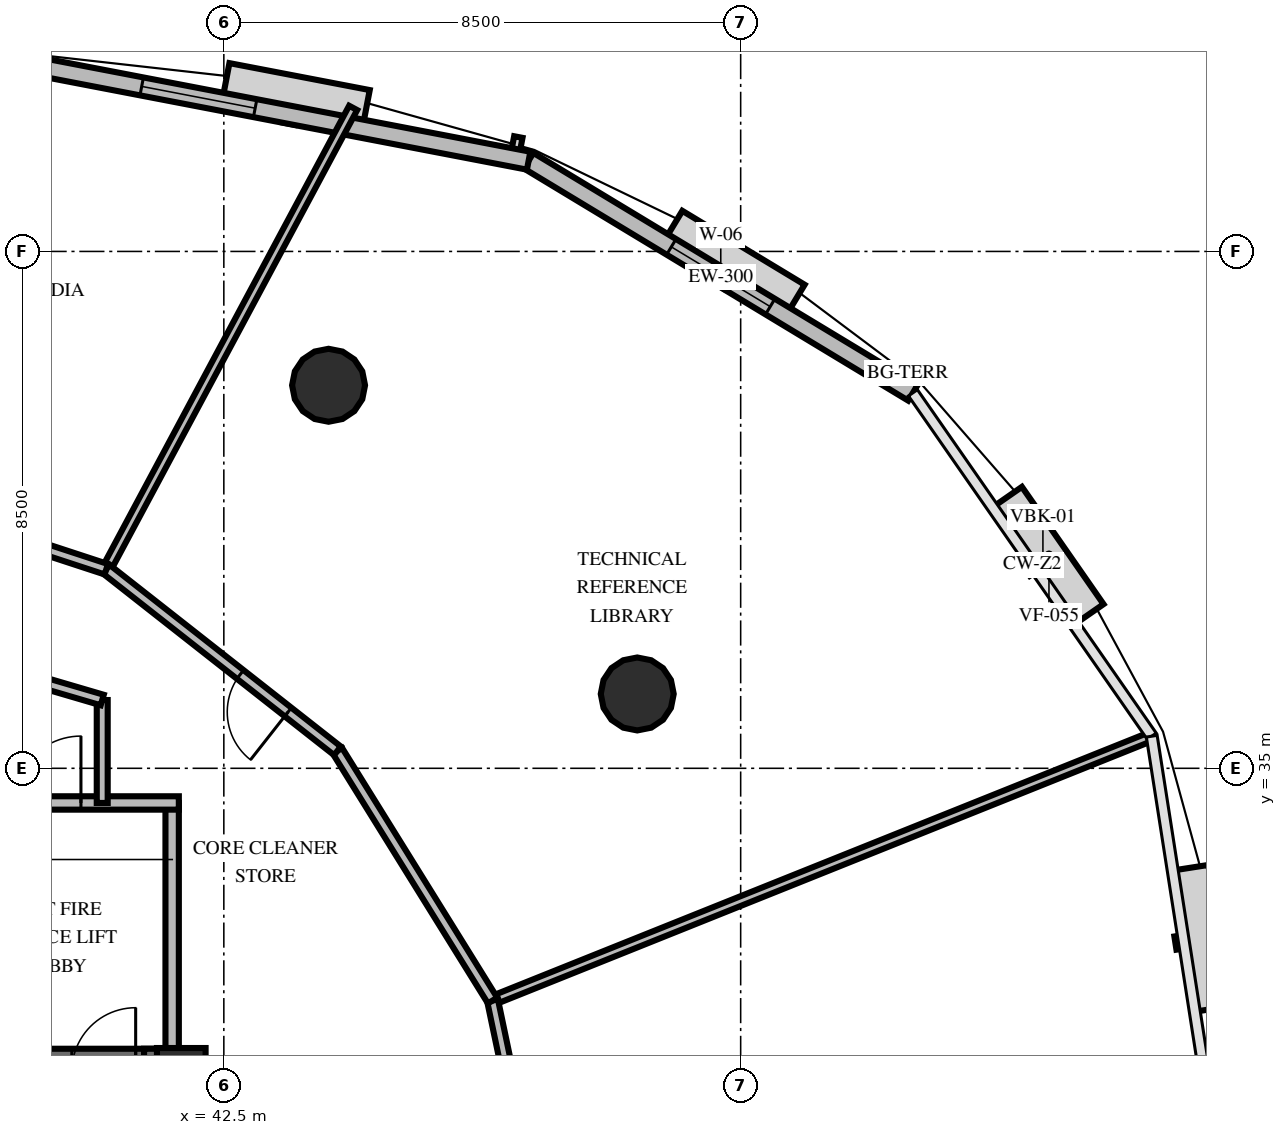
"""IFC4 building model, lengths in metres.
Left out: names, types, materials, properties, quantities, classifications, styles, units other than length and angle.
Written with IfcOpenShell. Run it as: python <this file> out.ifc"""

import sys

from ifc_helpers import new_model, si_unit, direction, frame, frame_2d, origin, origin_2d, place, context, subcontext, project, spatial, rectangle, circle, extrude, element, fill, save


model = new_model("IFC4")
c1 = context("Model", 3, precision=1e-05, world=origin(), true_north=direction((0.0, 1.0)))
c2 = subcontext(c1, "Body", "Model", "MODEL_VIEW")
j1 = project(units=[si_unit("LENGTHUNIT", "METRE"), si_unit("PLANEANGLEUNIT", "RADIAN")], contexts=[c1])
p1 = place(None, origin())
s1 = spatial("IfcSite", under=j1, at=p1, CompositionType="ELEMENT")
p2 = place(p1, origin())
s2 = spatial("IfcBuilding", under=s1, at=p2, CompositionType="ELEMENT")
p3 = place(p2, frame((0.0, 0.0, 125.8)))
s3 = spatial("IfcBuildingStorey", under=s2, at=p3, CompositionType="ELEMENT", Elevation=125.8)
p4 = place(p3, frame((26.072, 30.013, 0.0), z_axis=(0.0, 0.0, 1.0), x_axis=(1.0, 0.0, 0.0)))
e1 = element("IfcWall", 1, at=p4, inside=s3, PredefinedType="SHEAR", context=c2, shape_type="SweptSolid", body=[
    extrude(rectangle(XDim=15.866, YDim=0.75, at=frame_2d((7.933, 0.0))), origin(), (0.0, 0.0, 1.0), 4.0),
])
p5 = place(p4, frame((0.878, 0.0, 0.0)))
e2 = element("IfcOpeningElement", 2, at=p5, cuts=e1, PredefinedType="OPENING", context=c2, shape_type="SweptSolid", body=[
    extrude(rectangle(XDim=1.05, YDim=2.15, at=frame_2d((0.525, 1.075))), frame((0.0, 0.385, 0.0), z_axis=(0.0, -1.0, 0.0), x_axis=(1.0, 0.0, 0.0)), (0.0, 0.0, 1.0), 0.77),
])
p6 = place(p4, frame((13.928, 0.0, 0.0)))
e3 = element("IfcOpeningElement", 3, at=p6, cuts=e1, PredefinedType="OPENING", context=c2, shape_type="SweptSolid", body=[
    extrude(rectangle(XDim=1.05, YDim=2.15, at=frame_2d((0.525, 1.075))), frame((0.0, 0.385, 0.0), z_axis=(0.0, -1.0, 0.0), x_axis=(1.0, 0.0, 0.0)), (0.0, 0.0, 1.0), 0.77),
])
p7 = place(p4, frame((7.378, 0.0, 0.0)))
e4 = element("IfcOpeningElement", 4, at=p7, cuts=e1, PredefinedType="OPENING", context=c2, shape_type="SweptSolid", body=[
    extrude(rectangle(XDim=1.1, YDim=2.15, at=frame_2d((0.55, 1.075))), frame((0.0, 0.385, 0.0), z_axis=(0.0, -1.0, 0.0), x_axis=(1.0, 0.0, 0.0)), (0.0, 0.0, 1.0), 0.77),
])
p8 = place(p3, frame((41.563, 19.812, 0.0), z_axis=(0.0, 0.0, 1.0), x_axis=(0.0, 1.0, 0.0)))
e5 = element("IfcWall", 5, at=p8, inside=s3, PredefinedType="SHEAR", context=c2, shape_type="SweptSolid", body=[
    extrude(rectangle(XDim=10.576, YDim=0.75, at=frame_2d((5.288, 0.0))), origin(), (0.0, 0.0, 1.0), 4.0),
])
p9 = place(p3, frame((41.8, 30.0, 0.0), z_axis=(0.0, 0.0, 1.0), x_axis=(1.0, 0.0, 0.0)))
e6 = element("IfcColumn", 6, at=p9, inside=s3, PredefinedType="PILASTER", context=c2, shape_type="SweptSolid", body=[
    extrude(rectangle(XDim=0.8, YDim=0.8, at=origin_2d()), origin(), (0.0, 0.0, 1.0), 4.0),
])
for number, where, z_axis, x_axis in (
    (7, (49.299, 36.222, 0.0), (0.0, 0.0, 1.0), (1.0, 0.0, 0.0)),
    (8, (44.222, 41.299, 0.0), (0.0, 0.0, 1.0), (1.0, 0.0, 0.0)),
):
    element("IfcColumn", number, at=place(p3, frame(where, z_axis=z_axis, x_axis=x_axis)), inside=s3, PredefinedType="COLUMN", context=c2, shape_type="SweptSolid", body=[
        extrude(circle(Radius=0.6, at=origin_2d()), origin(), (0.0, 0.0, 1.0), 4.0),
    ])
p10 = place(p3, frame((53.833, 41.175, 0.0), z_axis=(0.0, 0.0, 1.0), x_axis=(-0.856004258132, 0.516968770875, 0.0)))
e9 = element("IfcWall", 9, at=p10, inside=s3, PredefinedType="SOLIDWALL", context=c2, shape_type="SweptSolid", body=[
    extrude(rectangle(XDim=7.383, YDim=0.3, at=frame_2d((3.692, 0.0))), origin(), (0.0, 0.0, 1.0), 2.9),
])
p11 = place(p10, frame((2.742, 0.0, 0.8)))
e10 = element("IfcOpeningElement", 10, at=p11, cuts=e9, PredefinedType="OPENING", context=c2, shape_type="SweptSolid", body=[
    extrude(rectangle(XDim=1.9, YDim=1.95, at=frame_2d((0.95, 0.975))), frame((0.0, 0.16, 0.0), z_axis=(0.0, -1.0, 0.0), x_axis=(1.0, 0.0, 0.0)), (0.0, 0.0, 1.0), 0.32),
])
p12 = place(p3, frame((47.513, 44.992, 0.0), z_axis=(0.0, 0.0, 1.0), x_axis=(-0.982062977667, 0.188553196461, 0.0)))
e11 = element("IfcWall", 11, at=p12, inside=s3, PredefinedType="SOLIDWALL", context=c2, shape_type="SweptSolid", body=[
    extrude(rectangle(XDim=8.095, YDim=0.3, at=frame_2d((4.048, 0.0))), origin(), (0.0, 0.0, 1.0), 2.9),
])
p13 = place(p12, frame((4.58, 0.0, 0.8)))
e12 = element("IfcOpeningElement", 12, at=p13, cuts=e11, PredefinedType="OPENING", context=c2, shape_type="SweptSolid", body=[
    extrude(rectangle(XDim=1.9, YDim=1.95, at=frame_2d((0.95, 0.975))), frame((0.0, 0.16, 0.0), z_axis=(0.0, -1.0, 0.0), x_axis=(1.0, 0.0, 0.0)), (0.0, 0.0, 1.0), 0.32),
])
p14 = place(p3, frame((41.65, 30.05, 0.0), z_axis=(0.0, 0.0, 1.0), x_axis=(0.0, 1.0, 0.0)))
e13 = element("IfcWall", 13, at=p14, inside=s3, PredefinedType="SOLIDWALL", context=c2, shape_type="SweptSolid", body=[
    extrude(rectangle(XDim=4.38, YDim=0.22, at=frame_2d((2.19, 0.0))), origin(), (0.0, 0.0, 1.0), 2.8),
])
p15 = place(p3, frame((37.45, 34.43, 0.0), z_axis=(0.0, 0.0, 1.0), x_axis=(1.0, 0.0, 0.0)))
e14 = element("IfcWall", 14, at=p15, inside=s3, PredefinedType="SOLIDWALL", context=c2, shape_type="SweptSolid", body=[
    extrude(rectangle(XDim=4.31, YDim=0.22, at=frame_2d((2.155, 0.0))), origin(), (0.0, 0.0, 1.0), 2.8),
])
p16 = place(p15, frame((1.6, 0.0, 0.0)))
e15 = element("IfcOpeningElement", 15, at=p16, cuts=e14, PredefinedType="OPENING", context=c2, shape_type="SweptSolid", body=[
    extrude(rectangle(XDim=1.1, YDim=2.15, at=frame_2d((0.55, 1.075))), frame((0.0, 0.12, 0.0), z_axis=(0.0, -1.0, 0.0), x_axis=(1.0, 0.0, 0.0)), (0.0, 0.0, 1.0), 0.24),
])
p17 = place(p3, frame((40.5, 36.123, 0.0), z_axis=(0.0, 0.0, 1.0), x_axis=(0.0, -1.0, 0.0)))
e16 = element("IfcWall", 16, at=p17, inside=s3, PredefinedType="PARTITIONING", context=c2, shape_type="SweptSolid", body=[
    extrude(rectangle(XDim=1.693, YDim=0.18, at=frame_2d((0.846, 0.0))), origin(), (0.0, 0.0, 1.0), 2.8),
])
p18 = place(p3, frame((34.0, 38.03, 0.0), z_axis=(0.0, 0.0, 1.0), x_axis=(0.959546654541, -0.281549671923, 0.0)))
e17 = element("IfcWall", 17, at=p18, inside=s3, PredefinedType="PARTITIONING", context=c2, shape_type="SweptSolid", body=[
    extrude(rectangle(XDim=6.774, YDim=0.18, at=frame_2d((3.387, 0.0))), origin(), (0.0, 0.0, 1.0), 2.8),
])
p19 = place(p18, frame((2.837, 0.0, 0.0)))
e18 = element("IfcOpeningElement", 18, at=p19, cuts=e17, PredefinedType="OPENING", context=c2, shape_type="SweptSolid", body=[
    extrude(rectangle(XDim=1.1, YDim=2.15, at=frame_2d((0.55, 1.075))), frame((0.0, 0.1, 0.0), z_axis=(0.0, -1.0, 0.0), x_axis=(1.0, 0.0, 0.0)), (0.0, 0.0, 1.0), 0.2),
])
p20 = place(p3, frame((46.92, 31.181, 0.0), z_axis=(0.0, 0.0, 1.0), x_axis=(0.928159216565, 0.372183380479, 0.0)))
e19 = element("IfcWall", 19, at=p20, inside=s3, PredefinedType="PARTITIONING", context=c2, shape_type="SweptSolid", body=[
    extrude(rectangle(XDim=11.68, YDim=0.15, at=frame_2d((5.84, 0.0))), origin(), (0.0, 0.0, 1.0), 2.8),
])
p21 = place(p3, frame((47.913, 26.449, 0.0), z_axis=(0.0, 0.0, 1.0), x_axis=(-0.205343584518, 0.978689946969, 0.0)))
e20 = element("IfcWall", 20, at=p21, inside=s3, PredefinedType="PARTITIONING", context=c2, shape_type="SweptSolid", body=[
    extrude(rectangle(XDim=4.834, YDim=0.18, at=frame_2d((2.417, 0.0))), origin(), (0.0, 0.0, 1.0), 2.8),
])
p22 = place(p3, frame((40.567, 38.273, 0.0), z_axis=(0.0, 0.0, 1.0), x_axis=(0.471771783587, 0.881720695125, 0.0)))
e21 = element("IfcWall", 21, at=p22, inside=s3, PredefinedType="PARTITIONING", context=c2, shape_type="SweptSolid", body=[
    extrude(rectangle(XDim=8.605, YDim=0.15, at=frame_2d((4.302, 0.0))), origin(), (0.0, 0.0, 1.0), 2.8),
])
p23 = place(p3, frame((46.92, 31.181, 0.0), z_axis=(0.0, 0.0, 1.0), x_axis=(-0.527690930955, 0.849436449293, 0.0)))
e22 = element("IfcWall", 22, at=p23, inside=s3, PredefinedType="PARTITIONING", context=c2, shape_type="SweptSolid", body=[
    extrude(rectangle(XDim=4.834, YDim=0.18, at=frame_2d((2.417, 0.0))), origin(), (0.0, 0.0, 1.0), 2.8),
])
p24 = place(p3, frame((44.369, 35.287, 0.0), z_axis=(0.0, 0.0, 1.0), x_axis=(-0.786395437725, 0.617723413451, 0.0)))
e23 = element("IfcWall", 23, at=p24, inside=s3, PredefinedType="PARTITIONING", context=c2, shape_type="SweptSolid", body=[
    extrude(rectangle(XDim=4.834, YDim=0.18, at=frame_2d((2.417, 0.0))), origin(), (0.0, 0.0, 1.0), 2.8),
])
p25 = place(p24, frame((1.034, 0.0, 0.0)))
e24 = element("IfcOpeningElement", 24, at=p25, cuts=e23, PredefinedType="OPENING", context=c2, shape_type="SweptSolid", body=[
    extrude(rectangle(XDim=1.0, YDim=2.15, at=frame_2d((0.5, 1.075))), frame((0.0, 0.1, 0.0), z_axis=(0.0, -1.0, 0.0), x_axis=(1.0, 0.0, 0.0)), (0.0, 0.0, 1.0), 0.2),
])
p26 = place(p3, frame((40.567, 38.273, 0.0), z_axis=(0.0, 0.0, 1.0), x_axis=(-0.950247186379, 0.311496845535, 0.0)))
e25 = element("IfcWall", 25, at=p26, inside=s3, PredefinedType="PARTITIONING", context=c2, shape_type="SweptSolid", body=[
    extrude(rectangle(XDim=4.834, YDim=0.18, at=frame_2d((2.417, 0.0))), origin(), (0.0, 0.0, 1.0), 2.8),
])
p27 = place(p26, frame((1.034, 0.0, 0.0)))
e26 = element("IfcOpeningElement", 26, at=p27, cuts=e25, PredefinedType="OPENING", context=c2, shape_type="SweptSolid", body=[
    extrude(rectangle(XDim=1.0, YDim=2.15, at=frame_2d((0.5, 1.075))), frame((0.0, 0.1, 0.0), z_axis=(0.0, -1.0, 0.0), x_axis=(1.0, 0.0, 0.0)), (0.0, 0.0, 1.0), 0.2),
])
p28 = place(p11, origin())
e27 = element("IfcWindow", 27, at=p28, inside=s3, PartitioningType="SINGLE_PANEL", PredefinedType="WINDOW", context=c2, shape_type="SweptSolid", body=[
    extrude(rectangle(XDim=1.9, YDim=1.95, at=frame_2d((0.95, 0.975))), frame((0.0, 0.03, 0.0), z_axis=(0.0, -1.0, 0.0), x_axis=(1.0, 0.0, 0.0)), (0.0, 0.0, 1.0), 0.06),
])
fill(e10, e27)
p29 = place(p13, origin())
e28 = element("IfcWindow", 28, at=p29, inside=s3, PartitioningType="SINGLE_PANEL", PredefinedType="WINDOW", context=c2, shape_type="SweptSolid", body=[
    extrude(rectangle(XDim=1.9, YDim=1.95, at=frame_2d((0.95, 0.975))), frame((0.0, 0.03, 0.0), z_axis=(0.0, -1.0, 0.0), x_axis=(1.0, 0.0, 0.0)), (0.0, 0.0, 1.0), 0.06),
])
fill(e12, e28)
p30 = place(p16, origin())
e29 = element("IfcDoor", 29, at=p30, inside=s3, OperationType="SINGLE_SWING_RIGHT", PredefinedType="DOOR", context=c2, shape_type="SweptSolid", body=[
    extrude(rectangle(XDim=1.1, YDim=2.15, at=frame_2d((0.55, 1.075))), frame((0.0, 0.025, 0.0), z_axis=(0.0, -1.0, 0.0), x_axis=(1.0, 0.0, 0.0)), (0.0, 0.0, 1.0), 0.05),
])
fill(e15, e29)
p31 = place(p25, origin())
e30 = element("IfcDoor", 30, at=p31, inside=s3, OperationType="SINGLE_SWING_LEFT", PredefinedType="DOOR", context=c2, shape_type="SweptSolid", body=[
    extrude(rectangle(XDim=1.0, YDim=2.15, at=frame_2d((0.5, 1.075))), frame((0.0, 0.025, 0.0), z_axis=(0.0, -1.0, 0.0), x_axis=(1.0, 0.0, 0.0)), (0.0, 0.0, 1.0), 0.05),
])
fill(e24, e30)
save(model, sys.argv[1])
